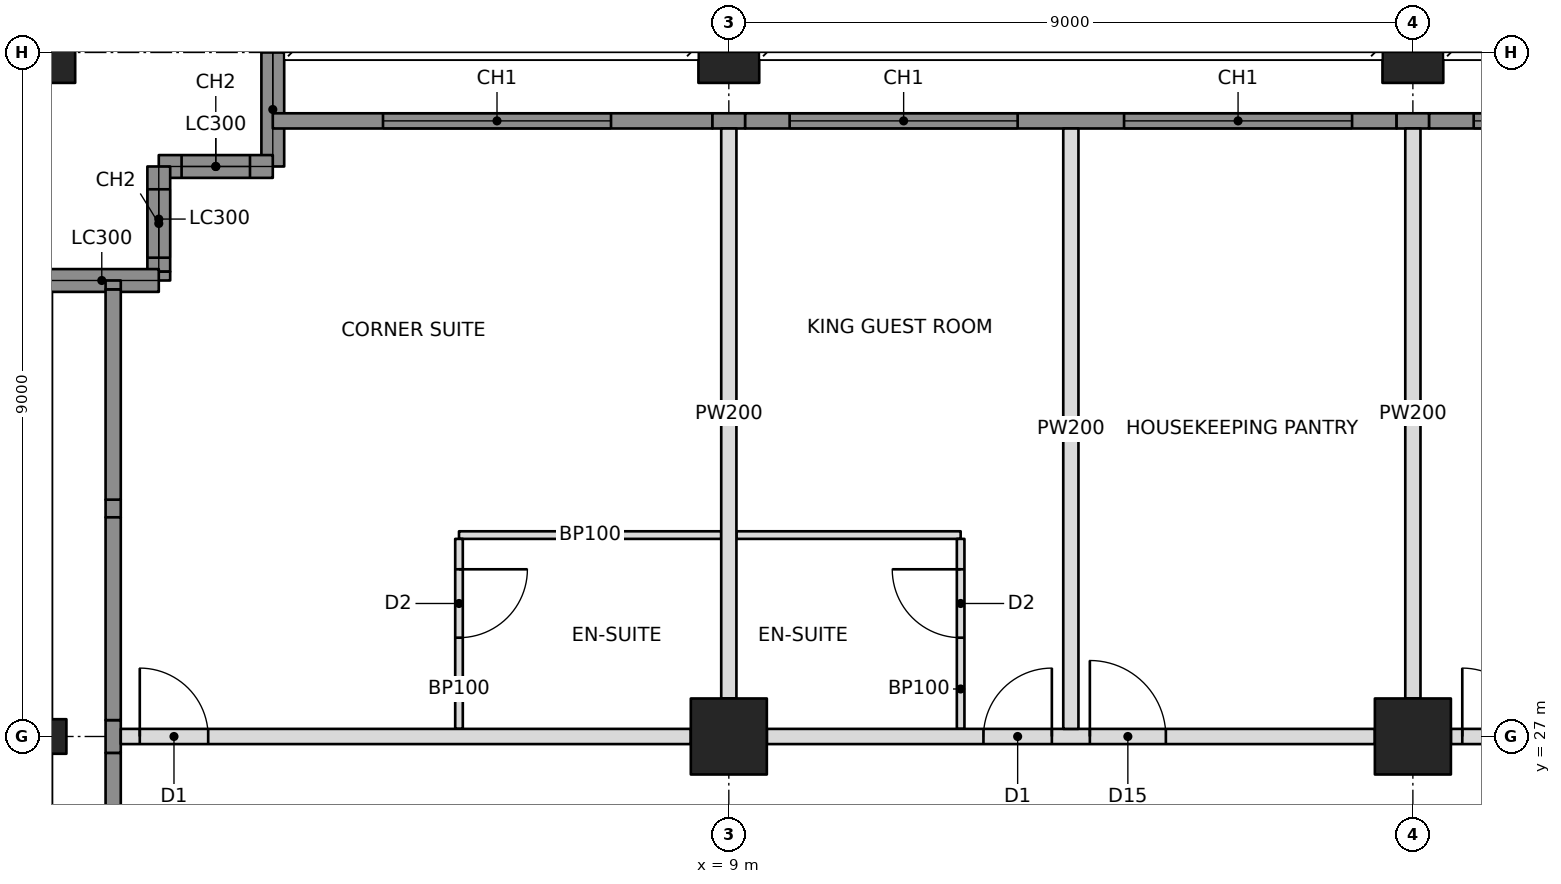
"""IFC4 building model, lengths in metres.
Left out: names, types, materials, properties, quantities, classifications, styles, units other than length and angle.
Written with IfcOpenShell. Run it as: python <this file> out.ifc"""

import sys

from ifc_helpers import new_model, si_unit, direction, frame, frame_2d, origin, origin_2d, place, context, subcontext, project, spatial, rectangle, hollow_rectangle, i_section, extrude, element, fill, save


model = new_model("IFC4")
c1 = context("Model", 3, precision=1e-05, world=origin(), true_north=direction((0.0, 1.0)))
c2 = subcontext(c1, "Body", "Model", "MODEL_VIEW")
j1 = project(units=[si_unit("LENGTHUNIT", "METRE"), si_unit("PLANEANGLEUNIT", "RADIAN")], contexts=[c1])
p1 = place(None, origin())
s1 = spatial("IfcSite", under=j1, at=p1, CompositionType="ELEMENT")
p2 = place(p1, origin())
s2 = spatial("IfcBuilding", under=s1, at=p2, CompositionType="ELEMENT")
p3 = place(p2, frame((0.0, 0.0, 85.8)))
s3 = spatial("IfcBuildingStorey", under=s2, at=p3, CompositionType="ELEMENT", Elevation=85.8)
p4 = place(p3, frame((0.0, 27.0, 0.0), z_axis=(0.0, 0.0, 1.0), x_axis=(0.0, 1.0, 0.0)))
e1 = element("IfcColumn", 1, at=p4, inside=s3, PredefinedType="COLUMN", context=c2, shape_type="SweptSolid", body=[
    extrude(i_section(OverallWidth=0.455, OverallDepth=0.569, WebThickness=0.078, FlangeThickness=0.125, at=origin_2d()), origin(), (0.0, 0.0, 1.0), 3.4),
])
p5 = place(p3, frame((0.0, 36.0, 0.0), z_axis=(0.0, 0.0, 1.0), x_axis=(1.0, 0.0, 0.0)))
e2 = element("IfcColumn", 2, at=p5, inside=s3, PredefinedType="COLUMN", context=c2, shape_type="SweptSolid", body=[
    extrude(hollow_rectangle(XDim=0.8, YDim=0.8, WallThickness=0.07, at=origin_2d()), origin(), (0.0, 0.0, 1.0), 3.4),
])
p6 = place(p3, frame((9.0, 27.0, 0.0), z_axis=(0.0, 0.0, 1.0), x_axis=(1.0, 0.0, 0.0)))
e3 = element("IfcColumn", 3, at=p6, inside=s3, PredefinedType="COLUMN", context=c2, shape_type="SweptSolid", body=[
    extrude(hollow_rectangle(XDim=1.0, YDim=1.0, WallThickness=0.1, at=origin_2d()), origin(), (0.0, 0.0, 1.0), 3.4),
])
p7 = place(p3, frame((9.0, 36.0, 0.0), z_axis=(0.0, 0.0, 1.0), x_axis=(1.0, 0.0, 0.0)))
e4 = element("IfcColumn", 4, at=p7, inside=s3, PredefinedType="COLUMN", context=c2, shape_type="SweptSolid", body=[
    extrude(hollow_rectangle(XDim=0.8, YDim=0.8, WallThickness=0.07, at=origin_2d()), origin(), (0.0, 0.0, 1.0), 3.4),
])
p8 = place(p3, frame((18.0, 27.0, 0.0), z_axis=(0.0, 0.0, 1.0), x_axis=(1.0, 0.0, 0.0)))
e5 = element("IfcColumn", 5, at=p8, inside=s3, PredefinedType="COLUMN", context=c2, shape_type="SweptSolid", body=[
    extrude(hollow_rectangle(XDim=1.0, YDim=1.0, WallThickness=0.1, at=origin_2d()), origin(), (0.0, 0.0, 1.0), 3.4),
])
p9 = place(p3, frame((18.0, 36.0, 0.0), z_axis=(0.0, 0.0, 1.0), x_axis=(1.0, 0.0, 0.0)))
e6 = element("IfcColumn", 6, at=p9, inside=s3, PredefinedType="COLUMN", context=c2, shape_type="SweptSolid", body=[
    extrude(hollow_rectangle(XDim=0.8, YDim=0.8, WallThickness=0.07, at=origin_2d()), origin(), (0.0, 0.0, 1.0), 3.4),
])
p10 = place(p3, frame((3.0, 36.0, 0.0), z_axis=(0.0, 0.0, 1.0), x_axis=(0.0, -1.0, 0.0)))
e7 = element("IfcWall", 7, at=p10, inside=s3, PredefinedType="SOLIDWALL", context=c2, shape_type="SweptSolid", body=[
    extrude(rectangle(XDim=1.5, YDim=0.3, at=frame_2d((0.75, 0.0))), origin(), (0.0, 0.0, 1.0), 2.202),
])
p11 = place(p3, frame((3.0, 34.5, 0.0), z_axis=(0.0, 0.0, 1.0), x_axis=(-1.0, 0.0, 0.0)))
e8 = element("IfcWall", 8, at=p11, inside=s3, PredefinedType="SOLIDWALL", context=c2, shape_type="SweptSolid", body=[
    extrude(rectangle(XDim=1.5, YDim=0.3, at=frame_2d((0.75, 0.0))), origin(), (0.0, 0.0, 1.0), 3.15),
])
p12 = place(p11, frame((0.3, 0.0, 0.6)))
e9 = element("IfcOpeningElement", 9, at=p12, cuts=e8, PredefinedType="OPENING", context=c2, shape_type="SweptSolid", body=[
    extrude(rectangle(XDim=0.9, YDim=2.2, at=frame_2d((0.45, 1.1))), frame((0.0, 0.16, 0.0), z_axis=(0.0, -1.0, 0.0), x_axis=(1.0, 0.0, 0.0)), (0.0, 0.0, 1.0), 0.32),
])
p13 = place(p3, frame((1.5, 34.5, 0.0), z_axis=(0.0, 0.0, 1.0), x_axis=(0.0, -1.0, 0.0)))
e10 = element("IfcWall", 10, at=p13, inside=s3, PredefinedType="SOLIDWALL", context=c2, shape_type="SweptSolid", body=[
    extrude(rectangle(XDim=1.384, YDim=0.3, at=frame_2d((0.692, 0.0))), origin(), (0.0, 0.0, 1.0), 3.15),
])
p14 = place(p13, frame((0.3, 0.0, 0.6)))
e11 = element("IfcOpeningElement", 11, at=p14, cuts=e10, PredefinedType="OPENING", context=c2, shape_type="SweptSolid", body=[
    extrude(rectangle(XDim=0.9, YDim=2.2, at=frame_2d((0.45, 1.1))), frame((0.0, 0.16, 0.0), z_axis=(0.0, -1.0, 0.0), x_axis=(1.0, 0.0, 0.0)), (0.0, 0.0, 1.0), 0.32),
])
p15 = place(p3, frame((1.5, 33.0, 0.0), z_axis=(0.0, 0.0, 1.0), x_axis=(-1.0, 0.0, 0.0)))
e12 = element("IfcWall", 12, at=p15, inside=s3, PredefinedType="SOLIDWALL", context=c2, shape_type="SweptSolid", body=[
    extrude(rectangle(XDim=1.5, YDim=0.3, at=frame_2d((0.75, 0.0))), origin(), (0.0, 0.0, 1.0), 2.202),
])
p16 = place(p3, frame((3.0, 35.1, 0.0), z_axis=(0.0, 0.0, 1.0), x_axis=(1.0, 0.0, 0.0)))
e13 = element("IfcWall", 13, at=p16, inside=s3, PredefinedType="SOLIDWALL", context=c2, shape_type="SweptSolid", body=[
    extrude(rectangle(XDim=5.785, YDim=0.2, at=frame_2d((2.892, 0.0))), origin(), (0.0, 0.0, 1.0), 3.15),
])
p17 = place(p16, frame((1.45, 0.0, 0.6)))
e14 = element("IfcOpeningElement", 14, at=p17, cuts=e13, PredefinedType="OPENING", context=c2, shape_type="SweptSolid", body=[
    extrude(rectangle(XDim=3.0, YDim=2.2, at=frame_2d((1.5, 1.1))), frame((0.0, 0.11, 0.0), z_axis=(0.0, -1.0, 0.0), x_axis=(1.0, 0.0, 0.0)), (0.0, 0.0, 1.0), 0.22),
])
p18 = place(p3, frame((1.0, 27.0, 0.0), z_axis=(0.0, 0.0, 1.0), x_axis=(1.0, 0.0, 0.0)))
e15 = element("IfcWall", 15, at=p18, inside=s3, PredefinedType="PARTITIONING", context=c2, shape_type="SweptSolid", body=[
    extrude(rectangle(XDim=7.5, YDim=0.2, at=frame_2d((3.75, 0.0))), origin(), (0.0, 0.0, 1.0), 2.21),
])
p19 = place(p18, frame((0.25, 0.0, 0.0)))
e16 = element("IfcOpeningElement", 16, at=p19, cuts=e15, PredefinedType="OPENING", context=c2, shape_type="SweptSolid", body=[
    extrude(rectangle(XDim=0.9, YDim=2.1, at=frame_2d((0.45, 1.05))), frame((0.0, 0.11, 0.0), z_axis=(0.0, -1.0, 0.0), x_axis=(1.0, 0.0, 0.0)), (0.0, 0.0, 1.0), 0.22),
])
p20 = place(p3, frame((9.5, 27.0, 0.0), z_axis=(0.0, 0.0, 1.0), x_axis=(1.0, 0.0, 0.0)))
e17 = element("IfcWall", 17, at=p20, inside=s3, PredefinedType="PARTITIONING", context=c2, shape_type="SweptSolid", body=[
    extrude(rectangle(XDim=8.0, YDim=0.2, at=frame_2d((4.0, 0.0))), origin(), (0.0, 0.0, 1.0), 2.21),
])
p21 = place(p20, frame((2.85, 0.0, 0.0)))
e18 = element("IfcOpeningElement", 18, at=p21, cuts=e17, PredefinedType="OPENING", context=c2, shape_type="SweptSolid", body=[
    extrude(rectangle(XDim=0.9, YDim=2.1, at=frame_2d((0.45, 1.05))), frame((0.0, 0.11, 0.0), z_axis=(0.0, -1.0, 0.0), x_axis=(1.0, 0.0, 0.0)), (0.0, 0.0, 1.0), 0.22),
])
p22 = place(p20, frame((4.25, 0.0, 0.0)))
e19 = element("IfcOpeningElement", 19, at=p22, cuts=e17, PredefinedType="OPENING", context=c2, shape_type="SweptSolid", body=[
    extrude(rectangle(XDim=1.0, YDim=2.1, at=frame_2d((0.5, 1.05))), frame((0.0, 0.11, 0.0), z_axis=(0.0, -1.0, 0.0), x_axis=(1.0, 0.0, 0.0)), (0.0, 0.0, 1.0), 0.22),
])
p23 = place(p3, frame((18.5, 27.0, 0.0), z_axis=(0.0, 0.0, 1.0), x_axis=(1.0, 0.0, 0.0)))
e20 = element("IfcWall", 20, at=p23, inside=s3, PredefinedType="PARTITIONING", context=c2, shape_type="SweptSolid", body=[
    extrude(rectangle(XDim=8.0, YDim=0.2, at=frame_2d((4.0, 0.0))), origin(), (0.0, 0.0, 1.0), 2.21),
])
p24 = place(p23, frame((0.15, 0.0, 0.0)))
e21 = element("IfcOpeningElement", 21, at=p24, cuts=e20, PredefinedType="OPENING", context=c2, shape_type="SweptSolid", body=[
    extrude(rectangle(XDim=0.9, YDim=2.1, at=frame_2d((0.45, 1.05))), frame((0.0, 0.11, 0.0), z_axis=(0.0, -1.0, 0.0), x_axis=(1.0, 0.0, 0.0)), (0.0, 0.0, 1.0), 0.22),
])
p25 = place(p3, frame((9.0, 27.5, 0.0), z_axis=(0.0, 0.0, 1.0), x_axis=(0.0, 1.0, 0.0)))
e22 = element("IfcWall", 22, at=p25, inside=s3, PredefinedType="PARTITIONING", context=c2, shape_type="SweptSolid", body=[
    extrude(rectangle(XDim=7.5, YDim=0.2, at=frame_2d((3.75, 0.0))), origin(), (0.0, 0.0, 1.0), 2.21),
])
p26 = place(p3, frame((13.5, 27.1, 0.0), z_axis=(0.0, 0.0, 1.0), x_axis=(0.0, 1.0, 0.0)))
e23 = element("IfcWall", 23, at=p26, inside=s3, PredefinedType="PARTITIONING", context=c2, shape_type="SweptSolid", body=[
    extrude(rectangle(XDim=7.9, YDim=0.2, at=frame_2d((3.95, 0.0))), origin(), (0.0, 0.0, 1.0), 2.21),
])
p27 = place(p3, frame((18.0, 27.5, 0.0), z_axis=(0.0, 0.0, 1.0), x_axis=(0.0, 1.0, 0.0)))
e24 = element("IfcWall", 24, at=p27, inside=s3, PredefinedType="PARTITIONING", context=c2, shape_type="SweptSolid", body=[
    extrude(rectangle(XDim=7.5, YDim=0.2, at=frame_2d((3.75, 0.0))), origin(), (0.0, 0.0, 1.0), 2.203),
])
p28 = place(p3, frame((5.45, 29.65, 0.0), z_axis=(0.0, 0.0, 1.0), x_axis=(1.0, 0.0, 0.0)))
e25 = element("IfcWall", 25, at=p28, inside=s3, PredefinedType="PARTITIONING", context=c2, shape_type="SweptSolid", body=[
    extrude(rectangle(XDim=3.45, YDim=0.1, at=frame_2d((1.725, 0.0))), origin(), (0.0, 0.0, 1.0), 2.21),
])
p29 = place(p3, frame((5.45, 27.1, 0.0), z_axis=(0.0, 0.0, 1.0), x_axis=(0.0, 1.0, 0.0)))
e26 = element("IfcWall", 26, at=p29, inside=s3, PredefinedType="PARTITIONING", context=c2, shape_type="SweptSolid", body=[
    extrude(rectangle(XDim=2.5, YDim=0.1, at=frame_2d((1.25, 0.0))), origin(), (0.0, 0.0, 1.0), 2.21),
])
p30 = place(p29, frame((1.2, 0.0, 0.0)))
e27 = element("IfcOpeningElement", 27, at=p30, cuts=e26, PredefinedType="OPENING", context=c2, shape_type="SweptSolid", body=[
    extrude(rectangle(XDim=0.9, YDim=2.1, at=frame_2d((0.45, 1.05))), frame((0.0, 0.06, 0.0), z_axis=(0.0, -1.0, 0.0), x_axis=(1.0, 0.0, 0.0)), (0.0, 0.0, 1.0), 0.12),
])
p31 = place(p3, frame((9.1, 29.65, 0.0), z_axis=(0.0, 0.0, 1.0), x_axis=(1.0, 0.0, 0.0)))
e28 = element("IfcWall", 28, at=p31, inside=s3, PredefinedType="PARTITIONING", context=c2, shape_type="SweptSolid", body=[
    extrude(rectangle(XDim=2.95, YDim=0.1, at=frame_2d((1.475, 0.0))), origin(), (0.0, 0.0, 1.0), 2.21),
])
p32 = place(p3, frame((12.05, 27.1, 0.0), z_axis=(0.0, 0.0, 1.0), x_axis=(0.0, 1.0, 0.0)))
e29 = element("IfcWall", 29, at=p32, inside=s3, PredefinedType="PARTITIONING", context=c2, shape_type="SweptSolid", body=[
    extrude(rectangle(XDim=2.5, YDim=0.1, at=frame_2d((1.25, 0.0))), origin(), (0.0, 0.0, 1.0), 2.21),
])
p33 = place(p32, frame((1.2, 0.0, 0.0)))
e30 = element("IfcOpeningElement", 30, at=p33, cuts=e29, PredefinedType="OPENING", context=c2, shape_type="SweptSolid", body=[
    extrude(rectangle(XDim=0.9, YDim=2.1, at=frame_2d((0.45, 1.05))), frame((0.0, 0.06, 0.0), z_axis=(0.0, -1.0, 0.0), x_axis=(1.0, 0.0, 0.0)), (0.0, 0.0, 1.0), 0.12),
])
p34 = place(p3, frame((1.5, 33.116, 0.0), z_axis=(0.0, 0.0, 1.0), x_axis=(0.0, -1.0, 0.0)))
e31 = element("IfcWall", 31, at=p34, inside=s3, PredefinedType="SOLIDWALL", context=c2, shape_type="SweptSolid", body=[
    extrude(rectangle(XDim=0.116, YDim=0.3, at=frame_2d((0.058, 0.0))), origin(), (0.0, 0.0, 1.0), 2.542),
])
p35 = place(p3, frame((0.9, 18.214, 0.0), z_axis=(0.0, 0.0, 1.0), x_axis=(0.0, 1.0, 0.0)))
e32 = element("IfcWall", 32, at=p35, inside=s3, PredefinedType="SOLIDWALL", context=c2, shape_type="SweptSolid", body=[
    extrude(rectangle(XDim=8.571, YDim=0.2, at=frame_2d((4.285, 0.0))), origin(), (0.0, 0.0, 1.0), 3.15),
])
p36 = place(p35, frame((0.136, 0.0, 0.6)))
e33 = element("IfcOpeningElement", 33, at=p36, cuts=e32, PredefinedType="OPENING", context=c2, shape_type="SweptSolid", body=[
    extrude(rectangle(XDim=3.0, YDim=2.2, at=frame_2d((1.5, 1.1))), frame((0.0, 0.11, 0.0), z_axis=(0.0, -1.0, 0.0), x_axis=(1.0, 0.0, 0.0)), (0.0, 0.0, 1.0), 0.22),
])
p37 = place(p35, frame((3.636, 0.0, 0.6)))
e34 = element("IfcOpeningElement", 34, at=p37, cuts=e32, PredefinedType="OPENING", context=c2, shape_type="SweptSolid", body=[
    extrude(rectangle(XDim=3.0, YDim=2.2, at=frame_2d((1.5, 1.1))), frame((0.0, 0.11, 0.0), z_axis=(0.0, -1.0, 0.0), x_axis=(1.0, 0.0, 0.0)), (0.0, 0.0, 1.0), 0.22),
])
p38 = place(p3, frame((0.9, 26.785, 0.0), z_axis=(0.0, 0.0, 1.0), x_axis=(0.0, 1.0, 0.0)))
e35 = element("IfcWall", 35, at=p38, inside=s3, PredefinedType="SOLIDWALL", context=c2, shape_type="SweptSolid", body=[
    extrude(rectangle(XDim=0.431, YDim=0.2, at=frame_2d((0.215, 0.0))), origin(), (0.0, 0.0, 1.0), 2.21),
])
p39 = place(p3, frame((0.9, 27.215, 0.0), z_axis=(0.0, 0.0, 1.0), x_axis=(0.0, 1.0, 0.0)))
e36 = element("IfcWall", 36, at=p39, inside=s3, PredefinedType="SOLIDWALL", context=c2, shape_type="SweptSolid", body=[
    extrude(rectangle(XDim=2.668, YDim=0.2, at=frame_2d((1.334, 0.0))), origin(), (0.0, 0.0, 1.0), 3.15),
])
p40 = place(p3, frame((0.9, 29.884, 0.0), z_axis=(0.0, 0.0, 1.0), x_axis=(0.0, 1.0, 0.0)))
e37 = element("IfcWall", 37, at=p40, inside=s3, PredefinedType="SOLIDWALL", context=c2, shape_type="SweptSolid", body=[
    extrude(rectangle(XDim=0.232, YDim=0.2, at=frame_2d((0.116, 0.0))), origin(), (0.0, 0.0, 1.0), 2.542),
])
p41 = place(p3, frame((0.9, 30.116, 0.0), z_axis=(0.0, 0.0, 1.0), x_axis=(0.0, 1.0, 0.0)))
e38 = element("IfcWall", 38, at=p41, inside=s3, PredefinedType="SOLIDWALL", context=c2, shape_type="SweptSolid", body=[
    extrude(rectangle(XDim=2.768, YDim=0.2, at=frame_2d((1.384, 0.0))), origin(), (0.0, 0.0, 1.0), 3.15),
])
p42 = place(p3, frame((0.9, 32.884, 0.0), z_axis=(0.0, 0.0, 1.0), x_axis=(0.0, 1.0, 0.0)))
e39 = element("IfcWall", 39, at=p42, inside=s3, PredefinedType="SOLIDWALL", context=c2, shape_type="SweptSolid", body=[
    extrude(rectangle(XDim=0.116, YDim=0.2, at=frame_2d((0.058, 0.0))), origin(), (0.0, 0.0, 1.0), 2.542),
])
p43 = place(p3, frame((8.785, 35.1, 0.0), z_axis=(0.0, 0.0, 1.0), x_axis=(1.0, 0.0, 0.0)))
e40 = element("IfcWall", 40, at=p43, inside=s3, PredefinedType="SOLIDWALL", context=c2, shape_type="SweptSolid", body=[
    extrude(rectangle(XDim=0.431, YDim=0.2, at=frame_2d((0.215, 0.0))), origin(), (0.0, 0.0, 1.0), 2.21),
])
p44 = place(p3, frame((9.215, 35.1, 0.0), z_axis=(0.0, 0.0, 1.0), x_axis=(1.0, 0.0, 0.0)))
e41 = element("IfcWall", 41, at=p44, inside=s3, PredefinedType="SOLIDWALL", context=c2, shape_type="SweptSolid", body=[
    extrude(rectangle(XDim=8.571, YDim=0.2, at=frame_2d((4.285, 0.0))), origin(), (0.0, 0.0, 1.0), 3.15),
])
p45 = place(p44, frame((0.585, 0.0, 0.6)))
e42 = element("IfcOpeningElement", 42, at=p45, cuts=e41, PredefinedType="OPENING", context=c2, shape_type="SweptSolid", body=[
    extrude(rectangle(XDim=3.0, YDim=2.2, at=frame_2d((1.5, 1.1))), frame((0.0, 0.11, 0.0), z_axis=(0.0, -1.0, 0.0), x_axis=(1.0, 0.0, 0.0)), (0.0, 0.0, 1.0), 0.22),
])
p46 = place(p44, frame((4.985, 0.0, 0.6)))
e43 = element("IfcOpeningElement", 43, at=p46, cuts=e41, PredefinedType="OPENING", context=c2, shape_type="SweptSolid", body=[
    extrude(rectangle(XDim=3.0, YDim=2.2, at=frame_2d((1.5, 1.1))), frame((0.0, 0.11, 0.0), z_axis=(0.0, -1.0, 0.0), x_axis=(1.0, 0.0, 0.0)), (0.0, 0.0, 1.0), 0.22),
])
p47 = place(p3, frame((17.786, 35.1, 0.0), z_axis=(0.0, 0.0, 1.0), x_axis=(1.0, 0.0, 0.0)))
e44 = element("IfcWall", 44, at=p47, inside=s3, PredefinedType="SOLIDWALL", context=c2, shape_type="SweptSolid", body=[
    extrude(rectangle(XDim=0.428, YDim=0.2, at=frame_2d((0.214, 0.0))), origin(), (0.0, 0.0, 1.0), 2.202),
])
p48 = place(p3, frame((18.214, 35.1, 0.0), z_axis=(0.0, 0.0, 1.0), x_axis=(1.0, 0.0, 0.0)))
e45 = element("IfcWall", 45, at=p48, inside=s3, PredefinedType="SOLIDWALL", context=c2, shape_type="SweptSolid", body=[
    extrude(rectangle(XDim=8.572, YDim=0.2, at=frame_2d((4.286, 0.0))), origin(), (0.0, 0.0, 1.0), 3.15),
])
p49 = place(p48, frame((0.586, 0.0, 0.6)))
e46 = element("IfcOpeningElement", 46, at=p49, cuts=e45, PredefinedType="OPENING", context=c2, shape_type="SweptSolid", body=[
    extrude(rectangle(XDim=3.0, YDim=2.2, at=frame_2d((1.5, 1.1))), frame((0.0, 0.11, 0.0), z_axis=(0.0, -1.0, 0.0), x_axis=(1.0, 0.0, 0.0)), (0.0, 0.0, 1.0), 0.22),
])
p50 = place(p48, frame((4.986, 0.0, 0.6)))
e47 = element("IfcOpeningElement", 47, at=p50, cuts=e45, PredefinedType="OPENING", context=c2, shape_type="SweptSolid", body=[
    extrude(rectangle(XDim=3.0, YDim=2.2, at=frame_2d((1.5, 1.1))), frame((0.0, 0.11, 0.0), z_axis=(0.0, -1.0, 0.0), x_axis=(1.0, 0.0, 0.0)), (0.0, 0.0, 1.0), 0.22),
])
p51 = place(p12, origin())
e48 = element("IfcWindow", 48, at=p51, inside=s3, PartitioningType="SINGLE_PANEL", PredefinedType="WINDOW", context=c2, shape_type="SweptSolid", body=[
    extrude(rectangle(XDim=0.9, YDim=2.2, at=frame_2d((0.45, 1.1))), frame((0.0, 0.03, 0.0), z_axis=(0.0, -1.0, 0.0), x_axis=(1.0, 0.0, 0.0)), (0.0, 0.0, 1.0), 0.06),
])
fill(e9, e48)
p52 = place(p14, origin())
e49 = element("IfcWindow", 49, at=p52, inside=s3, PartitioningType="SINGLE_PANEL", PredefinedType="WINDOW", context=c2, shape_type="SweptSolid", body=[
    extrude(rectangle(XDim=0.9, YDim=2.2, at=frame_2d((0.45, 1.1))), frame((0.0, 0.03, 0.0), z_axis=(0.0, -1.0, 0.0), x_axis=(1.0, 0.0, 0.0)), (0.0, 0.0, 1.0), 0.06),
])
fill(e11, e49)
p53 = place(p17, origin())
e50 = element("IfcWindow", 50, at=p53, inside=s3, PartitioningType="TRIPLE_PANEL_VERTICAL", PredefinedType="WINDOW", context=c2, shape_type="SweptSolid", body=[
    extrude(rectangle(XDim=3.0, YDim=2.2, at=frame_2d((1.5, 1.1))), frame((0.0, 0.03, 0.0), z_axis=(0.0, -1.0, 0.0), x_axis=(1.0, 0.0, 0.0)), (0.0, 0.0, 1.0), 0.06),
])
fill(e14, e50)
p54 = place(p45, origin())
e51 = element("IfcWindow", 51, at=p54, inside=s3, PartitioningType="TRIPLE_PANEL_VERTICAL", PredefinedType="WINDOW", context=c2, shape_type="SweptSolid", body=[
    extrude(rectangle(XDim=3.0, YDim=2.2, at=frame_2d((1.5, 1.1))), frame((0.0, 0.03, 0.0), z_axis=(0.0, -1.0, 0.0), x_axis=(1.0, 0.0, 0.0)), (0.0, 0.0, 1.0), 0.06),
])
fill(e42, e51)
p55 = place(p46, origin())
e52 = element("IfcWindow", 52, at=p55, inside=s3, PartitioningType="TRIPLE_PANEL_VERTICAL", PredefinedType="WINDOW", context=c2, shape_type="SweptSolid", body=[
    extrude(rectangle(XDim=3.0, YDim=2.2, at=frame_2d((1.5, 1.1))), frame((0.0, 0.03, 0.0), z_axis=(0.0, -1.0, 0.0), x_axis=(1.0, 0.0, 0.0)), (0.0, 0.0, 1.0), 0.06),
])
fill(e43, e52)
p56 = place(p49, origin())
e53 = element("IfcWindow", 53, at=p56, inside=s3, PartitioningType="TRIPLE_PANEL_VERTICAL", PredefinedType="WINDOW", context=c2, shape_type="SweptSolid", body=[
    extrude(rectangle(XDim=3.0, YDim=2.2, at=frame_2d((1.5, 1.1))), frame((0.0, 0.03, 0.0), z_axis=(0.0, -1.0, 0.0), x_axis=(1.0, 0.0, 0.0)), (0.0, 0.0, 1.0), 0.06),
])
fill(e46, e53)
p57 = place(p30, frame((0.9, 0.0, 0.0), z_axis=(0.0, 0.0, 1.0), x_axis=(-1.0, 0.0, 0.0)))
e54 = element("IfcDoor", 54, at=p57, inside=s3, OperationType="SINGLE_SWING_LEFT", PredefinedType="DOOR", context=c2, shape_type="SweptSolid", body=[
    extrude(rectangle(XDim=0.9, YDim=2.1, at=frame_2d((0.45, 1.05))), frame((0.0, 0.025, 0.0), z_axis=(0.0, -1.0, 0.0), x_axis=(1.0, 0.0, 0.0)), (0.0, 0.0, 1.0), 0.05),
])
fill(e27, e54)
p58 = place(p19, origin())
e55 = element("IfcDoor", 55, at=p58, inside=s3, OperationType="SINGLE_SWING_LEFT", PredefinedType="DOOR", context=c2, shape_type="SweptSolid", body=[
    extrude(rectangle(XDim=0.9, YDim=2.1, at=frame_2d((0.45, 1.05))), frame((0.0, 0.025, 0.0), z_axis=(0.0, -1.0, 0.0), x_axis=(1.0, 0.0, 0.0)), (0.0, 0.0, 1.0), 0.05),
])
fill(e16, e55)
p59 = place(p33, origin())
e56 = element("IfcDoor", 56, at=p59, inside=s3, OperationType="SINGLE_SWING_RIGHT", PredefinedType="DOOR", context=c2, shape_type="SweptSolid", body=[
    extrude(rectangle(XDim=0.9, YDim=2.1, at=frame_2d((0.45, 1.05))), frame((0.0, 0.025, 0.0), z_axis=(0.0, -1.0, 0.0), x_axis=(1.0, 0.0, 0.0)), (0.0, 0.0, 1.0), 0.05),
])
fill(e30, e56)
p60 = place(p21, origin())
e57 = element("IfcDoor", 57, at=p60, inside=s3, OperationType="SINGLE_SWING_RIGHT", PredefinedType="DOOR", context=c2, shape_type="SweptSolid", body=[
    extrude(rectangle(XDim=0.9, YDim=2.1, at=frame_2d((0.45, 1.05))), frame((0.0, 0.025, 0.0), z_axis=(0.0, -1.0, 0.0), x_axis=(1.0, 0.0, 0.0)), (0.0, 0.0, 1.0), 0.05),
])
fill(e18, e57)
p61 = place(p22, origin())
e58 = element("IfcDoor", 58, at=p61, inside=s3, OperationType="SINGLE_SWING_LEFT", PredefinedType="DOOR", context=c2, shape_type="SweptSolid", body=[
    extrude(rectangle(XDim=1.0, YDim=2.1, at=frame_2d((0.5, 1.05))), frame((0.0, 0.025, 0.0), z_axis=(0.0, -1.0, 0.0), x_axis=(1.0, 0.0, 0.0)), (0.0, 0.0, 1.0), 0.05),
])
fill(e19, e58)
p62 = place(p24, origin())
e59 = element("IfcDoor", 59, at=p62, inside=s3, OperationType="SINGLE_SWING_LEFT", PredefinedType="DOOR", context=c2, shape_type="SweptSolid", body=[
    extrude(rectangle(XDim=0.9, YDim=2.1, at=frame_2d((0.45, 1.05))), frame((0.0, 0.025, 0.0), z_axis=(0.0, -1.0, 0.0), x_axis=(1.0, 0.0, 0.0)), (0.0, 0.0, 1.0), 0.05),
])
fill(e21, e59)
save(model, sys.argv[1])
